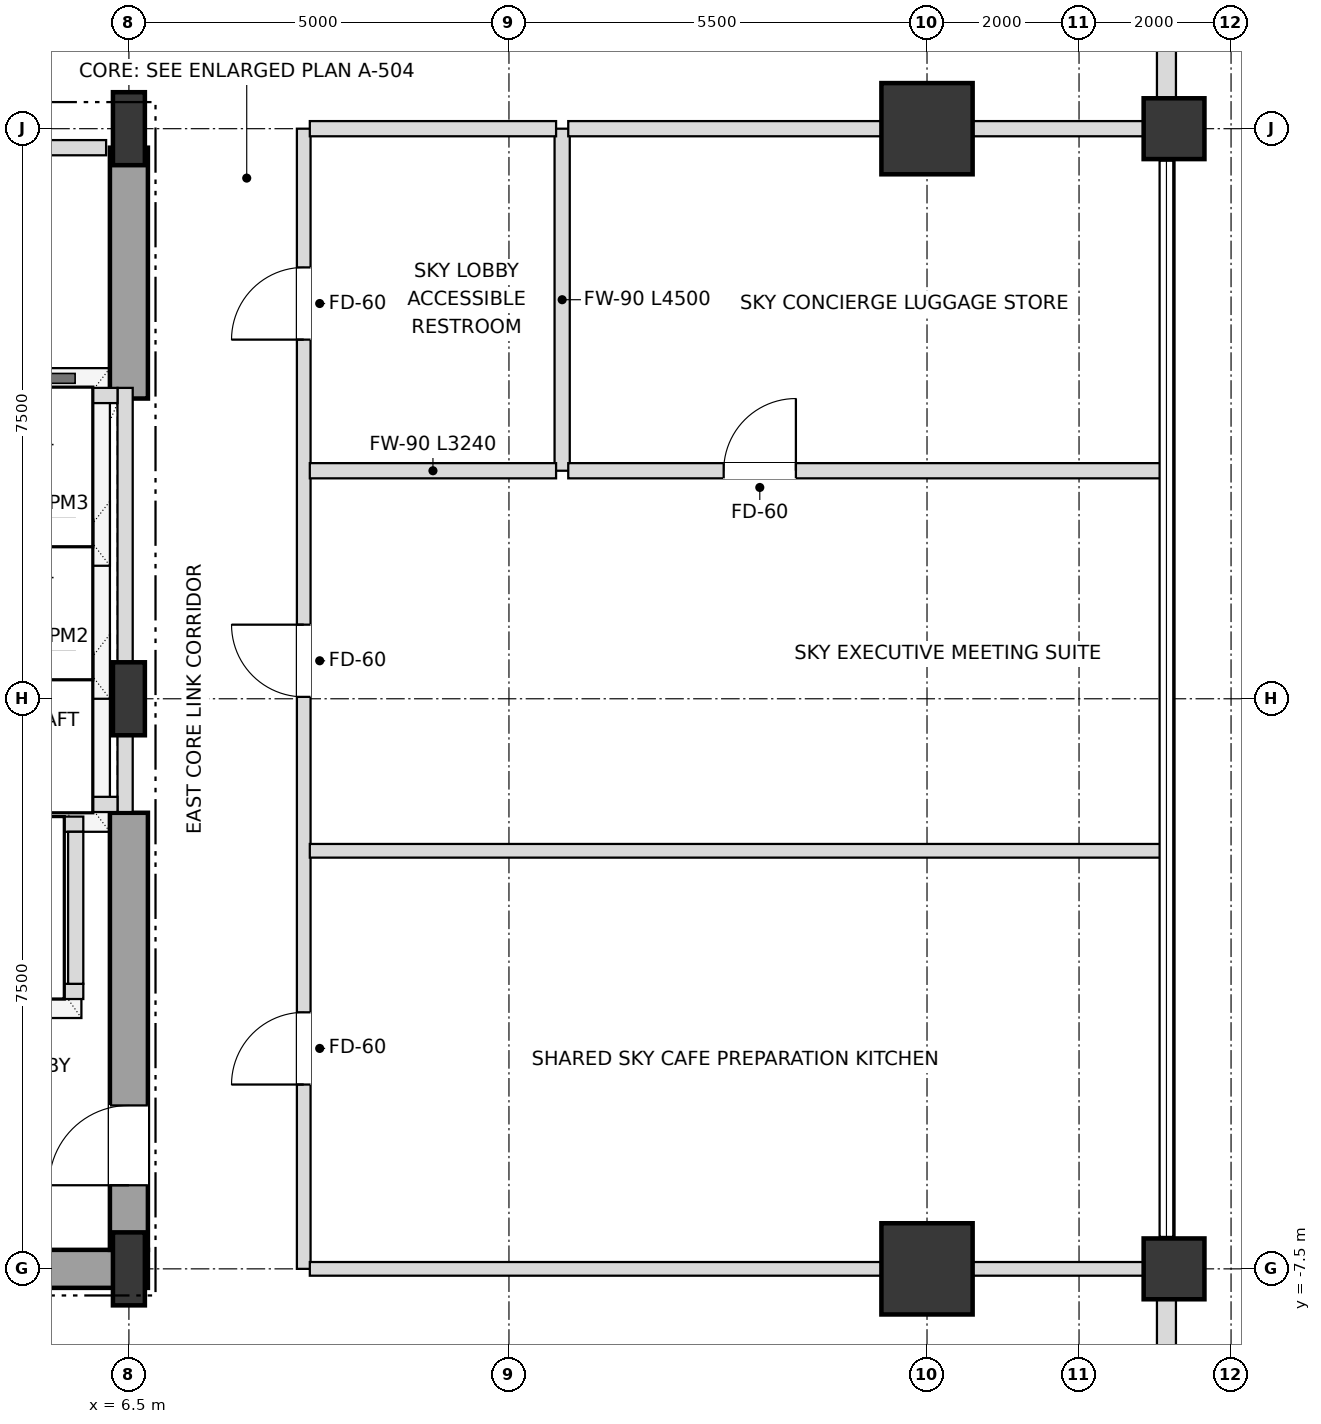
"""IFC4 building model, lengths in metres.
Left out: names, types, materials, properties, quantities, classifications, styles, units other than length and angle.
Written with IfcOpenShell. Run it as: python <this file> out.ifc"""

import sys

from ifc_helpers import new_model, si_unit, direction, frame, frame_2d, origin, origin_2d, place, context, subcontext, project, spatial, rectangle, i_section, extrude, element, fill, save


model = new_model("IFC4")
c1 = context("Model", 3, precision=1e-05, world=origin(), true_north=direction((0.0, 1.0)))
c2 = subcontext(c1, "Body", "Model", "MODEL_VIEW")
j1 = project(units=[si_unit("LENGTHUNIT", "METRE"), si_unit("PLANEANGLEUNIT", "RADIAN")], contexts=[c1])
p1 = place(None, origin())
s1 = spatial("IfcSite", under=j1, at=p1, CompositionType="ELEMENT")
p2 = place(p1, origin())
s2 = spatial("IfcBuilding", under=s1, at=p2, CompositionType="ELEMENT")
p3 = place(p2, frame((0.0, 0.0, 125.1)))
s3 = spatial("IfcBuildingStorey", under=s2, at=p3, CompositionType="ELEMENT", Elevation=125.1)
for number, where, z_axis, x_axis in (
    (1, (6.5, -7.5, 0.0), (0.0, 0.0, 1.0), (1.0, 0.0, 0.0)),
    (2, (6.5, 0.0, 0.0), (0.0, 0.0, 1.0), (1.0, 0.0, 0.0)),
    (3, (6.5, 7.5, 0.0), (0.0, 0.0, 1.0), (1.0, 0.0, 0.0)),
):
    element("IfcColumn", number, at=place(p3, frame(where, z_axis=z_axis, x_axis=x_axis)), inside=s3, PredefinedType="COLUMN", context=c2, shape_type="SweptSolid", body=[
        extrude(i_section(OverallWidth=0.42, OverallDepth=0.96, WebThickness=0.022, FlangeThickness=0.034, at=origin_2d()), origin(), (0.0, 0.0, 1.0), 4.5),
    ])
for number, where, z_axis, x_axis in (
    (4, (17.0, -7.5, 0.0), (0.0, 0.0, 1.0), (1.0, 0.0, 0.0)),
    (5, (17.0, 7.5, 0.0), (0.0, 0.0, 1.0), (1.0, 0.0, 0.0)),
):
    element("IfcColumn", number, at=place(p3, frame(where, z_axis=z_axis, x_axis=x_axis)), inside=s3, PredefinedType="USERDEFINED", context=c2, shape_type="SweptSolid", body=[
        extrude(rectangle(XDim=1.2, YDim=1.2, at=origin_2d()), origin(), (0.0, 0.0, 1.0), 4.5),
    ])
for number, where, z_axis, x_axis in (
    (6, (20.25, -7.5, 0.0), (0.0, 0.0, 1.0), (1.0, 0.0, 0.0)),
    (7, (20.25, 7.5, 0.0), (0.0, 0.0, 1.0), (1.0, 0.0, 0.0)),
):
    element("IfcColumn", number, at=place(p3, frame(where, z_axis=z_axis, x_axis=x_axis)), inside=s3, PredefinedType="COLUMN", context=c2, shape_type="SweptSolid", body=[
        extrude(rectangle(XDim=0.8, YDim=0.8, at=origin_2d()), origin(), (0.0, 0.0, 1.0), 4.5),
    ])
p4 = place(p3, frame((20.15, -12.605, 0.0), z_axis=(0.0, 0.0, 1.0), x_axis=(0.0, 1.0, 0.0)))
e8 = element("IfcWall", 8, at=p4, inside=s3, PredefinedType="SOLIDWALL", context=c2, shape_type="SweptSolid", body=[
    extrude(rectangle(XDim=4.71, YDim=0.25, at=frame_2d((2.355, 0.0))), origin(), (0.0, 0.0, 1.0), 3.636),
])
p5 = place(p4, frame((1.455, 0.0, 0.72)))
e9 = element("IfcOpeningElement", 9, at=p5, cuts=e8, PredefinedType="OPENING", context=c2, shape_type="SweptSolid", body=[
    extrude(rectangle(XDim=1.8, YDim=1.68, at=frame_2d((0.9, 0.84))), frame((0.0, 0.135, 0.0), z_axis=(0.0, -1.0, 0.0), x_axis=(1.0, 0.0, 0.0)), (0.0, 0.0, 1.0), 0.27),
])
p6 = place(p3, frame((20.15, 7.895, 0.0), z_axis=(0.0, 0.0, 1.0), x_axis=(0.0, 1.0, 0.0)))
e10 = element("IfcWall", 10, at=p6, inside=s3, PredefinedType="SOLIDWALL", context=c2, shape_type="SweptSolid", body=[
    extrude(rectangle(XDim=4.71, YDim=0.25, at=frame_2d((2.355, 0.0))), origin(), (0.0, 0.0, 1.0), 3.636),
])
p7 = place(p6, frame((1.455, 0.0, 0.72)))
e11 = element("IfcOpeningElement", 11, at=p7, cuts=e10, PredefinedType="OPENING", context=c2, shape_type="SweptSolid", body=[
    extrude(rectangle(XDim=1.8, YDim=1.68, at=frame_2d((0.9, 0.84))), frame((0.0, 0.135, 0.0), z_axis=(0.0, -1.0, 0.0), x_axis=(1.0, 0.0, 0.0)), (0.0, 0.0, 1.0), 0.27),
])
p8 = place(p3, frame((0.0, -7.5, 0.0), z_axis=(0.0, 0.0, 1.0), x_axis=(1.0, 0.0, 0.0)))
e12 = element("IfcWall", 12, at=p8, inside=s3, PredefinedType="SHEAR", context=c2, shape_type="SweptSolid", body=[
    extrude(rectangle(XDim=6.75, YDim=0.5, at=frame_2d((3.375, 0.0))), origin(), (0.0, 0.0, 1.0), 4.28),
])
p9 = place(p3, frame((6.5, -7.25, 0.0), z_axis=(0.0, 0.0, 1.0), x_axis=(0.0, 1.0, 0.0)))
e13 = element("IfcWall", 13, at=p9, inside=s3, PredefinedType="SHEAR", context=c2, shape_type="SweptSolid", body=[
    extrude(rectangle(XDim=5.75, YDim=0.5, at=frame_2d((2.875, 0.0))), origin(), (0.0, 0.0, 1.0), 4.28),
])
p10 = place(p9, frame((0.85, 0.0, 0.0)))
e14 = element("IfcOpeningElement", 14, at=p10, cuts=e13, PredefinedType="OPENING", context=c2, shape_type="SweptSolid", body=[
    extrude(rectangle(XDim=1.05, YDim=2.15, at=frame_2d((0.525, 1.075))), frame((0.0, 0.26, 0.0), z_axis=(0.0, -1.0, 0.0), x_axis=(1.0, 0.0, 0.0)), (0.0, 0.0, 1.0), 0.52),
])
p11 = place(p3, frame((6.5, 3.95, 0.0), z_axis=(0.0, 0.0, 1.0), x_axis=(0.0, 1.0, 0.0)))
e15 = element("IfcWall", 15, at=p11, inside=s3, PredefinedType="SHEAR", context=c2, shape_type="SweptSolid", body=[
    extrude(rectangle(XDim=3.3, YDim=0.5, at=frame_2d((1.65, 0.0))), origin(), (0.0, 0.0, 1.0), 4.28),
])
p12 = place(p3, frame((6.45, -1.49, 0.0), z_axis=(0.0, 0.0, 1.0), x_axis=(0.0, 1.0, 0.0)))
e16 = element("IfcWall", 16, at=p12, inside=s3, PredefinedType="SOLIDWALL", context=c2, shape_type="SweptSolid", body=[
    extrude(rectangle(XDim=5.58, YDim=0.2, at=frame_2d((2.79, 0.0))), origin(), (0.0, 0.0, 1.0), 3.716),
])
for number, where, z_axis, x_axis in (
    (17, (4.15, -1.39, 0.0), (0.0, 0.0, 1.0), (1.0, 0.0, 0.0)),
    (18, (4.15, 3.99, 0.0), (0.0, 0.0, 1.0), (1.0, 0.0, 0.0)),
):
    element("IfcWall", number, at=place(p3, frame(where, z_axis=z_axis, x_axis=x_axis)), inside=s3, PredefinedType="SOLIDWALL", context=c2, shape_type="SweptSolid", body=[
        extrude(rectangle(XDim=2.2, YDim=0.2, at=frame_2d((1.1, 0.0))), origin(), (0.0, 0.0, 1.0), 4.28),
    ])
p13 = place(p3, frame((1.8, -3.85, 0.0), z_axis=(0.0, 0.0, 1.0), x_axis=(1.0, 0.0, 0.0)))
e19 = element("IfcWall", 19, at=p13, inside=s3, PredefinedType="SOLIDWALL", context=c2, shape_type="SweptSolid", body=[
    extrude(rectangle(XDim=4.1, YDim=0.2, at=frame_2d((2.05, 0.0))), origin(), (0.0, 0.0, 1.0), 4.28),
])
p14 = place(p13, frame((0.45, 0.0, 0.0)))
e20 = element("IfcOpeningElement", 20, at=p14, cuts=e19, PredefinedType="OPENING", context=c2, shape_type="SweptSolid", body=[
    extrude(rectangle(XDim=1.2, YDim=2.2, at=frame_2d((0.6, 1.1))), frame((0.0, 0.11, 0.0), z_axis=(0.0, -1.0, 0.0), x_axis=(1.0, 0.0, 0.0)), (0.0, 0.0, 1.0), 0.22),
])
p15 = place(p13, frame((2.45, 0.0, 0.0)))
e21 = element("IfcOpeningElement", 21, at=p15, cuts=e19, PredefinedType="OPENING", context=c2, shape_type="SweptSolid", body=[
    extrude(rectangle(XDim=1.2, YDim=2.2, at=frame_2d((0.6, 1.1))), frame((0.0, 0.11, 0.0), z_axis=(0.0, -1.0, 0.0), x_axis=(1.0, 0.0, 0.0)), (0.0, 0.0, 1.0), 0.22),
])
p16 = place(p3, frame((1.8, -1.65, 0.0), z_axis=(0.0, 0.0, 1.0), x_axis=(1.0, 0.0, 0.0)))
e22 = element("IfcWall", 22, at=p16, inside=s3, PredefinedType="SOLIDWALL", context=c2, shape_type="SweptSolid", body=[
    extrude(rectangle(XDim=4.1, YDim=0.2, at=frame_2d((2.05, 0.0))), origin(), (0.0, 0.0, 1.0), 4.28),
])
p17 = place(p3, frame((5.8, -3.75, 0.0), z_axis=(0.0, 0.0, 1.0), x_axis=(0.0, 1.0, 0.0)))
e23 = element("IfcWall", 23, at=p17, inside=s3, PredefinedType="SOLIDWALL", context=c2, shape_type="SweptSolid", body=[
    extrude(rectangle(XDim=2.0, YDim=0.2, at=frame_2d((1.0, 0.0))), origin(), (0.0, 0.0, 1.0), 4.28),
])
p18 = place(p3, frame((8.8, -7.5, 0.0), z_axis=(0.0, 0.0, 1.0), x_axis=(0.0, 1.0, 0.0)))
e24 = element("IfcWall", 24, at=p18, inside=s3, PredefinedType="PARTITIONING", context=c2, shape_type="SweptSolid", body=[
    extrude(rectangle(XDim=15.0, YDim=0.18, at=frame_2d((7.5, 0.0))), origin(), (0.0, 0.0, 1.0), 4.28),
])
p19 = place(p18, frame((2.425, 0.0, 0.0)))
e25 = element("IfcOpeningElement", 25, at=p19, cuts=e24, PredefinedType="OPENING", context=c2, shape_type="SweptSolid", body=[
    extrude(rectangle(XDim=0.95, YDim=2.15, at=frame_2d((0.475, 1.075))), frame((0.0, 0.1, 0.0), z_axis=(0.0, -1.0, 0.0), x_axis=(1.0, 0.0, 0.0)), (0.0, 0.0, 1.0), 0.2),
])
p20 = place(p18, frame((7.525, 0.0, 0.0)))
e26 = element("IfcOpeningElement", 26, at=p20, cuts=e24, PredefinedType="OPENING", context=c2, shape_type="SweptSolid", body=[
    extrude(rectangle(XDim=0.95, YDim=2.15, at=frame_2d((0.475, 1.075))), frame((0.0, 0.1, 0.0), z_axis=(0.0, -1.0, 0.0), x_axis=(1.0, 0.0, 0.0)), (0.0, 0.0, 1.0), 0.2),
])
p21 = place(p18, frame((12.225, 0.0, 0.0)))
e27 = element("IfcOpeningElement", 27, at=p21, cuts=e24, PredefinedType="OPENING", context=c2, shape_type="SweptSolid", body=[
    extrude(rectangle(XDim=0.95, YDim=2.15, at=frame_2d((0.475, 1.075))), frame((0.0, 0.1, 0.0), z_axis=(0.0, -1.0, 0.0), x_axis=(1.0, 0.0, 0.0)), (0.0, 0.0, 1.0), 0.2),
])
p22 = place(p3, frame((12.2, 3.0, 0.0), z_axis=(0.0, 0.0, 1.0), x_axis=(0.0, 1.0, 0.0)))
e28 = element("IfcWall", 28, at=p22, inside=s3, PredefinedType="SOLIDWALL", context=c2, shape_type="SweptSolid", body=[
    extrude(rectangle(XDim=4.5, YDim=0.2, at=frame_2d((2.25, 0.0))), origin(), (0.0, 0.0, 1.0), 4.28),
])
p23 = place(p3, frame((8.88, -7.5, 0.0), z_axis=(0.0, 0.0, 1.0), x_axis=(1.0, 0.0, 0.0)))
e29 = element("IfcWall", 29, at=p23, inside=s3, PredefinedType="PARTITIONING", context=c2, shape_type="SweptSolid", body=[
    extrude(rectangle(XDim=11.27, YDim=0.18, at=frame_2d((5.635, 0.0))), origin(), (0.0, 0.0, 1.0), 3.716),
])
p24 = place(p3, frame((8.88, -2.0, 0.0), z_axis=(0.0, 0.0, 1.0), x_axis=(1.0, 0.0, 0.0)))
e30 = element("IfcWall", 30, at=p24, inside=s3, PredefinedType="PARTITIONING", context=c2, shape_type="SweptSolid", body=[
    extrude(rectangle(XDim=11.19, YDim=0.18, at=frame_2d((5.595, 0.0))), origin(), (0.0, 0.0, 1.0), 3.716),
])
p25 = place(p3, frame((8.88, 3.0, 0.0), z_axis=(0.0, 0.0, 1.0), x_axis=(1.0, 0.0, 0.0)))
e31 = element("IfcWall", 31, at=p25, inside=s3, PredefinedType="SOLIDWALL", context=c2, shape_type="SweptSolid", body=[
    extrude(rectangle(XDim=3.24, YDim=0.2, at=frame_2d((1.62, 0.0))), origin(), (0.0, 0.0, 1.0), 4.28),
])
p26 = place(p3, frame((12.28, 3.0, 0.0), z_axis=(0.0, 0.0, 1.0), x_axis=(1.0, 0.0, 0.0)))
e32 = element("IfcWall", 32, at=p26, inside=s3, PredefinedType="SOLIDWALL", context=c2, shape_type="SweptSolid", body=[
    extrude(rectangle(XDim=7.79, YDim=0.2, at=frame_2d((3.895, 0.0))), origin(), (0.0, 0.0, 1.0), 3.716),
])
p27 = place(p26, frame((2.045, 0.0, 0.0)))
e33 = element("IfcOpeningElement", 33, at=p27, cuts=e32, PredefinedType="OPENING", context=c2, shape_type="SweptSolid", body=[
    extrude(rectangle(XDim=0.95, YDim=2.15, at=frame_2d((0.475, 1.075))), frame((0.0, 0.11, 0.0), z_axis=(0.0, -1.0, 0.0), x_axis=(1.0, 0.0, 0.0)), (0.0, 0.0, 1.0), 0.22),
])
p28 = place(p3, frame((4.13, 7.25, 0.0), z_axis=(0.0, 0.0, 1.0), x_axis=(1.0, 0.0, 0.0)))
e34 = element("IfcWall", 34, at=p28, inside=s3, PredefinedType="SOLIDWALL", context=c2, shape_type="SweptSolid", body=[
    extrude(rectangle(XDim=2.07, YDim=0.2, at=frame_2d((1.035, 0.0))), origin(), (0.0, 0.0, 1.0), 4.28),
])
p29 = place(p3, frame((8.88, 7.5, 0.0), z_axis=(0.0, 0.0, 1.0), x_axis=(1.0, 0.0, 0.0)))
e35 = element("IfcWall", 35, at=p29, inside=s3, PredefinedType="SOLIDWALL", context=c2, shape_type="SweptSolid", body=[
    extrude(rectangle(XDim=3.24, YDim=0.2, at=frame_2d((1.62, 0.0))), origin(), (0.0, 0.0, 1.0), 3.716),
])
p30 = place(p3, frame((12.28, 7.5, 0.0), z_axis=(0.0, 0.0, 1.0), x_axis=(1.0, 0.0, 0.0)))
e36 = element("IfcWall", 36, at=p30, inside=s3, PredefinedType="SOLIDWALL", context=c2, shape_type="SweptSolid", body=[
    extrude(rectangle(XDim=7.87, YDim=0.2, at=frame_2d((3.935, 0.0))), origin(), (0.0, 0.0, 1.0), 3.716),
])
p31 = place(p10, origin())
e37 = element("IfcDoor", 37, at=p31, inside=s3, OperationType="SINGLE_SWING_LEFT", PredefinedType="DOOR", context=c2, shape_type="SweptSolid", body=[
    extrude(rectangle(XDim=1.05, YDim=2.15, at=frame_2d((0.525, 1.075))), frame((0.0, 0.025, 0.0), z_axis=(0.0, -1.0, 0.0), x_axis=(1.0, 0.0, 0.0)), (0.0, 0.0, 1.0), 0.05),
])
fill(e14, e37)
p32 = place(p19, origin())
e38 = element("IfcDoor", 38, at=p32, inside=s3, OperationType="SINGLE_SWING_LEFT", PredefinedType="DOOR", context=c2, shape_type="SweptSolid", body=[
    extrude(rectangle(XDim=0.95, YDim=2.15, at=frame_2d((0.475, 1.075))), frame((0.0, 0.025, 0.0), z_axis=(0.0, -1.0, 0.0), x_axis=(1.0, 0.0, 0.0)), (0.0, 0.0, 1.0), 0.05),
])
fill(e25, e38)
p33 = place(p20, origin())
e39 = element("IfcDoor", 39, at=p33, inside=s3, OperationType="SINGLE_SWING_RIGHT", PredefinedType="DOOR", context=c2, shape_type="SweptSolid", body=[
    extrude(rectangle(XDim=0.95, YDim=2.15, at=frame_2d((0.475, 1.075))), frame((0.0, 0.025, 0.0), z_axis=(0.0, -1.0, 0.0), x_axis=(1.0, 0.0, 0.0)), (0.0, 0.0, 1.0), 0.05),
])
fill(e26, e39)
p34 = place(p21, origin())
e40 = element("IfcDoor", 40, at=p34, inside=s3, OperationType="SINGLE_SWING_LEFT", PredefinedType="DOOR", context=c2, shape_type="SweptSolid", body=[
    extrude(rectangle(XDim=0.95, YDim=2.15, at=frame_2d((0.475, 1.075))), frame((0.0, 0.025, 0.0), z_axis=(0.0, -1.0, 0.0), x_axis=(1.0, 0.0, 0.0)), (0.0, 0.0, 1.0), 0.05),
])
fill(e27, e40)
p35 = place(p27, origin())
e41 = element("IfcDoor", 41, at=p35, inside=s3, OperationType="SINGLE_SWING_RIGHT", PredefinedType="DOOR", context=c2, shape_type="SweptSolid", body=[
    extrude(rectangle(XDim=0.95, YDim=2.15, at=frame_2d((0.475, 1.075))), frame((0.0, 0.025, 0.0), z_axis=(0.0, -1.0, 0.0), x_axis=(1.0, 0.0, 0.0)), (0.0, 0.0, 1.0), 0.05),
])
fill(e33, e41)
save(model, sys.argv[1])
